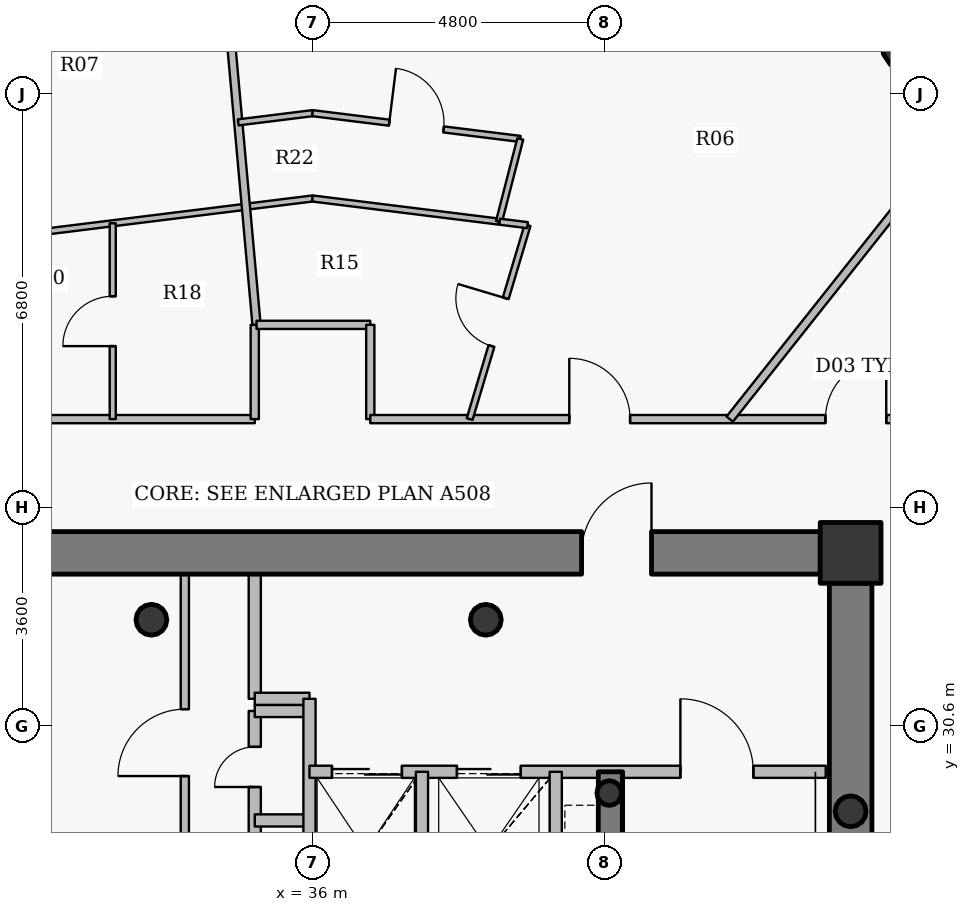
"""IFC4 building model, lengths in metres.
Left out: names, types, materials, properties, quantities, classifications, styles, units other than length and angle.
Written with IfcOpenShell. Run it as: python <this file> out.ifc"""

import sys

from ifc_helpers import new_model, si_unit, direction, frame, frame_2d, origin, origin_2d, place, context, subcontext, project, spatial, rectangle, hollow_circle, extrude, source, transform, mapped, element, fill, save


model = new_model("IFC4")
c1 = context("Model", 3, precision=1e-05, world=origin(), true_north=direction((0.0, 1.0)))
c2 = subcontext(c1, "Body", "Model", "MODEL_VIEW")
j1 = project(units=[si_unit("LENGTHUNIT", "METRE"), si_unit("PLANEANGLEUNIT", "RADIAN")], contexts=[c1])
p1 = place(None, origin())
s1 = spatial("IfcSite", under=j1, at=p1, CompositionType="ELEMENT")
p2 = place(p1, origin())
s2 = spatial("IfcBuilding", under=s1, at=p2, CompositionType="ELEMENT")
p3 = place(p2, frame((0.0, 0.0, 276.75)))
s3 = spatial("IfcBuildingStorey", under=s2, at=p3, CompositionType="ELEMENT", Elevation=276.75)
p4 = place(p3, frame((44.85, 33.45, 0.0), z_axis=(0.0, 0.0, 1.0), x_axis=(1.0, 0.0, 0.0)))
e1 = element("IfcColumn", 1, at=p4, inside=s3, PredefinedType="COLUMN", context=c2, shape_type="SweptSolid", body=[
    extrude(rectangle(XDim=1.0, YDim=1.0, at=origin_2d()), origin(), (0.0, 0.0, 1.0), 3.75),
])
for number, where, z_axis, x_axis in (
    (2, (38.85, 32.35, 0.0), (0.0, 0.0, 1.0), (1.0, 0.0, 0.0)),
    (3, (33.35, 32.35, 0.0), (0.0, 0.0, 1.0), (1.0, 0.0, 0.0)),
):
    element("IfcColumn", number, at=place(p3, frame(where, z_axis=z_axis, x_axis=x_axis)), inside=s3, PredefinedType="COLUMN", context=c2, shape_type="SweptSolid", body=[
        extrude(hollow_circle(Radius=0.254, WallThickness=0.02, at=origin_2d()), origin(), (0.0, 0.0, 1.0), 3.75),
    ])
p5 = place(p3, frame((40.88, 29.5, 0.0), z_axis=(0.0, 0.0, 1.0), x_axis=(1.0, 0.0, 0.0)))
e4 = element("IfcColumn", 4, at=p5, inside=s3, PredefinedType="COLUMN", context=c2, shape_type="SweptSolid", body=[
    extrude(hollow_circle(Radius=0.203, WallThickness=0.016, at=origin_2d()), origin(), (0.0, 0.0, 1.0), 3.75),
])
p6 = place(p3, frame((27.65, 33.45, 0.0), z_axis=(0.0, 0.0, 1.0), x_axis=(1.0, 0.0, 0.0)))
e5 = element("IfcWall", 5, at=p6, inside=s3, PredefinedType="SHEAR", context=c2, shape_type="SweptSolid", body=[
    extrude(rectangle(XDim=16.7, YDim=0.7, at=frame_2d((8.35, 0.0))), origin(), (0.0, 0.0, 1.0), 3.05),
])
p7 = place(p6, frame((12.775, 0.0, 0.0)))
e6 = element("IfcOpeningElement", 6, at=p7, cuts=e5, PredefinedType="OPENING", context=c2, shape_type="SweptSolid", body=[
    extrude(rectangle(XDim=1.15, YDim=2.15, at=origin_2d()), frame((0.575, 0.36, 1.075), z_axis=(0.0, -1.0, 0.0), x_axis=(1.0, 0.0, 0.0)), (0.0, 0.0, 1.0), 0.72),
])
p8 = place(p3, frame((44.85, 32.95, 0.0), z_axis=(0.0, 0.0, 1.0), x_axis=(0.0, -1.0, 0.0)))
e7 = element("IfcWall", 7, at=p8, inside=s3, PredefinedType="SHEAR", context=c2, shape_type="SweptSolid", body=[
    extrude(rectangle(XDim=11.9, YDim=0.7, at=frame_2d((5.95, 0.0))), origin(), (0.0, 0.0, 1.0), 3.05),
])
p9 = place(p3, frame((40.9, 27.25, 0.0), z_axis=(0.0, 0.0, 1.0), x_axis=(0.0, 1.0, 0.0)))
e8 = element("IfcWall", 8, at=p9, inside=s3, PredefinedType="SHEAR", context=c2, shape_type="SweptSolid", body=[
    extrude(rectangle(XDim=2.6, YDim=0.4, at=frame_2d((1.3, 0.0))), origin(), (0.0, 0.0, 1.0), 3.1),
])
p10 = place(p3, frame((45.854, 41.839, 0.0), z_axis=(0.0, 0.0, 1.0), x_axis=(1.0, 0.0, 0.0)))
e9 = element("IfcColumn", 9, at=p10, inside=s3, PredefinedType="COLUMN", context=c2, shape_type="SweptSolid", body=[
    extrude(hollow_circle(Radius=0.5, WallThickness=0.032, at=origin_2d()), origin(), (0.0, 0.0, 1.0), 3.75),
])
p11 = place(p3, frame((44.85, 29.2, 0.0), z_axis=(0.0, 0.0, 1.0), x_axis=(1.0, 0.0, 0.0)))
e10 = element("IfcColumn", 10, at=p11, inside=s3, PredefinedType="COLUMN", context=c2, shape_type="SweptSolid", body=[
    extrude(hollow_circle(Radius=0.254, WallThickness=0.02, at=origin_2d()), origin(), (0.0, 0.0, 1.0), 3.75),
])
p12 = place(p3, frame((24.95, 35.65, 0.0), z_axis=(0.0, 0.0, 1.0), x_axis=(1.0, 0.0, 0.0)))
e11 = element("IfcWall", 11, at=p12, inside=s3, PredefinedType="PARTITIONING", context=c2, shape_type="SweptSolid", body=[
    extrude(rectangle(XDim=10.1, YDim=0.135, at=frame_2d((5.05, 0.0))), origin(), (0.0, 0.0, 1.0), 3.035),
])
p13 = place(p12, frame((2.362, 0.0, 0.0)))
e12 = element("IfcOpeningElement", 12, at=p13, cuts=e11, PredefinedType="OPENING", context=c2, shape_type="SweptSolid", body=[
    extrude(rectangle(XDim=1.0, YDim=2.15, at=origin_2d()), frame((0.5, 0.078, 1.075), z_axis=(0.0, -1.0, 0.0), x_axis=(1.0, 0.0, 0.0)), (0.0, 0.0, 1.0), 0.155),
])
p14 = place(p3, frame((31.155, 38.677, 0.0), z_axis=(0.0, 0.0, 1.0), x_axis=(0.99239360053, 0.123105408601, 0.0)))
e13 = element("IfcWall", 13, at=p14, inside=s3, PredefinedType="PARTITIONING", context=c2, shape_type="SweptSolid", body=[
    extrude(rectangle(XDim=4.883, YDim=0.1, at=frame_2d((2.441, 0.0))), origin(), (0.0, 0.0, 1.0), 3.035),
])
p15 = place(p3, frame((32.714, 35.65, 0.0), z_axis=(0.0, 0.0, 1.0), x_axis=(0.0, 1.0, 0.0)))
e14 = element("IfcWall", 14, at=p15, inside=s3, PredefinedType="PARTITIONING", context=c2, shape_type="SweptSolid", body=[
    extrude(rectangle(XDim=3.221, YDim=0.1, at=frame_2d((1.61, 0.0))), origin(), (0.0, 0.0, 1.0), 3.5),
])
p16 = place(p15, frame((1.2, 0.0, 0.0)))
e15 = element("IfcOpeningElement", 15, at=p16, cuts=e14, PredefinedType="OPENING", context=c2, shape_type="SweptSolid", body=[
    extrude(rectangle(XDim=0.82, YDim=2.1, at=origin_2d()), frame((0.41, 0.06, 1.05), z_axis=(0.0, -1.0, 0.0), x_axis=(1.0, 0.0, 0.0)), (0.0, 0.0, 1.0), 0.12),
])
p17 = place(p3, frame((33.9, 27.56, 0.0), z_axis=(0.0, 0.0, 1.0), x_axis=(0.0, 1.0, 0.0)))
e16 = element("IfcWall", 16, at=p17, inside=s3, PredefinedType="PARTITIONING", context=c2, shape_type="SweptSolid", body=[
    extrude(rectangle(XDim=5.54, YDim=0.135, at=frame_2d((2.77, 0.0))), origin(), (0.0, 0.0, 1.0), 3.085),
])
p18 = place(p17, frame((2.22, 0.0, 0.0)))
e17 = element("IfcOpeningElement", 17, at=p18, cuts=e16, PredefinedType="OPENING", context=c2, shape_type="SweptSolid", body=[
    extrude(rectangle(XDim=1.1, YDim=2.15, at=origin_2d()), frame((0.55, 0.078, 1.075), z_axis=(0.0, -1.0, 0.0), x_axis=(1.0, 0.0, 0.0)), (0.0, 0.0, 1.0), 0.155),
])
p19 = place(p3, frame((34.436, 44.324, 0.0), z_axis=(0.0, 0.0, 1.0), x_axis=(0.089904837352, -0.99595036032, 0.0)))
e18 = element("IfcWall", 18, at=p19, inside=s3, PredefinedType="PARTITIONING", context=c2, shape_type="SweptSolid", body=[
    extrude(rectangle(XDim=7.153, YDim=0.135, at=frame_2d((3.576, 0.0))), origin(), (0.0, 0.0, 1.0), 2.985),
])
p20 = place(p3, frame((34.779, 40.53, 0.0), z_axis=(0.0, 0.0, 1.0), x_axis=(0.992405544762, 0.123009083917, 0.0)))
e19 = element("IfcWall", 19, at=p20, inside=s3, PredefinedType="PARTITIONING", context=c2, shape_type="SweptSolid", body=[
    extrude(rectangle(XDim=1.23, YDim=0.1, at=frame_2d((0.615, 0.0))), origin(), (0.0, 0.0, 1.0), 3.035),
])
p21 = place(p3, frame((35.05, 27.25, 0.0), z_axis=(0.0, 0.0, 1.0), x_axis=(0.0, 1.0, 0.0)))
e20 = element("IfcWall", 20, at=p21, inside=s3, PredefinedType="PARTITIONING", context=c2, shape_type="SweptSolid", body=[
    extrude(rectangle(XDim=3.6, YDim=0.2, at=frame_2d((1.8, 0.0))), origin(), (0.0, 0.0, 1.0), 3.5),
])
p22 = place(p21, frame((0.59, 0.0, 0.0)))
e21 = element("IfcOpeningElement", 21, at=p22, cuts=e20, PredefinedType="OPENING", context=c2, shape_type="SweptSolid", body=[
    extrude(rectangle(XDim=0.66, YDim=2.05, at=origin_2d()), frame((0.33, 0.11, 1.025), z_axis=(0.0, -1.0, 0.0), x_axis=(1.0, 0.0, 0.0)), (0.0, 0.0, 1.0), 0.22),
])
p23 = place(p21, frame((2.35, 0.0, 0.0)))
e22 = element("IfcOpeningElement", 22, at=p23, cuts=e20, PredefinedType="OPENING", context=c2, shape_type="SweptSolid", body=[
    extrude(rectangle(XDim=0.66, YDim=2.05, at=origin_2d()), frame((0.33, 0.11, 1.025), z_axis=(0.0, -1.0, 0.0), x_axis=(1.0, 0.0, 0.0)), (0.0, 0.0, 1.0), 0.22),
])
for number, where, z_axis, x_axis in (
    (23, (35.05, 29.05, 0.0), (0.0, 0.0, 1.0), (1.0, 0.0, 0.0)),
    (24, (35.05, 30.85, 0.0), (0.0, 0.0, 1.0), (1.0, 0.0, 0.0)),
):
    element("IfcWall", number, at=place(p3, frame(where, z_axis=z_axis, x_axis=x_axis)), inside=s3, PredefinedType="PARTITIONING", context=c2, shape_type="SweptSolid", body=[
        extrude(rectangle(XDim=0.9, YDim=0.2, at=frame_2d((0.45, 0.0))), origin(), (0.0, 0.0, 1.0), 3.5),
    ])
p24 = place(p3, frame((35.05, 31.05, 0.0), z_axis=(0.0, 0.0, 1.0), x_axis=(0.0, 1.0, 0.0)))
e25 = element("IfcWall", 25, at=p24, inside=s3, PredefinedType="PARTITIONING", context=c2, shape_type="SweptSolid", body=[
    extrude(rectangle(XDim=2.05, YDim=0.2, at=frame_2d((1.025, 0.0))), origin(), (0.0, 0.0, 1.0), 3.085),
])
p25 = place(p3, frame((35.05, 31.05, 0.0), z_axis=(0.0, 0.0, 1.0), x_axis=(1.0, 0.0, 0.0)))
e26 = element("IfcWall", 26, at=p25, inside=s3, PredefinedType="PARTITIONING", context=c2, shape_type="SweptSolid", body=[
    extrude(rectangle(XDim=0.9, YDim=0.2, at=frame_2d((0.45, 0.0))), origin(), (0.0, 0.0, 1.0), 3.5),
])
p26 = place(p3, frame((35.05, 35.65, 0.0), z_axis=(0.0, 0.0, 1.0), x_axis=(0.0, 1.0, 0.0)))
e27 = element("IfcWall", 27, at=p26, inside=s3, PredefinedType="PARTITIONING", context=c2, shape_type="SweptSolid", body=[
    extrude(rectangle(XDim=1.55, YDim=0.135, at=frame_2d((0.775, 0.0))), origin(), (0.0, 0.0, 1.0), 3.5),
])
p27 = place(p3, frame((35.079, 37.2, 0.0), z_axis=(0.0, 0.0, 1.0), x_axis=(1.0, 0.0, 0.0)))
e28 = element("IfcWall", 28, at=p27, inside=s3, PredefinedType="PARTITIONING", context=c2, shape_type="SweptSolid", body=[
    extrude(rectangle(XDim=1.871, YDim=0.135, at=frame_2d((0.935, 0.0))), origin(), (0.0, 0.0, 1.0), 3.035),
])
p28 = place(p3, frame((35.95, 27.25, 0.0), z_axis=(0.0, 0.0, 1.0), x_axis=(0.0, 1.0, 0.0)))
e29 = element("IfcWall", 29, at=p28, inside=s3, PredefinedType="PARTITIONING", context=c2, shape_type="SweptSolid", body=[
    extrude(rectangle(XDim=3.8, YDim=0.2, at=frame_2d((1.9, 0.0))), origin(), (0.0, 0.0, 1.0), 3.5),
])
p29 = place(p3, frame((35.95, 29.85, 0.0), z_axis=(0.0, 0.0, 1.0), x_axis=(1.0, 0.0, 0.0)))
e30 = element("IfcWall", 30, at=p29, inside=s3, PredefinedType="PARTITIONING", context=c2, shape_type="SweptSolid", body=[
    extrude(rectangle(XDim=8.49, YDim=0.2, at=frame_2d((4.245, 0.0))), origin(), (0.0, 0.0, 1.0), 3.085),
])
p30 = place(p29, frame((6.1, 0.0, 0.0)))
e31 = element("IfcOpeningElement", 31, at=p30, cuts=e30, PredefinedType="OPENING", context=c2, shape_type="SweptSolid", body=[
    extrude(rectangle(XDim=1.2, YDim=2.15, at=origin_2d()), frame((0.6, 0.11, 1.075), z_axis=(0.0, -1.0, 0.0), x_axis=(1.0, 0.0, 0.0)), (0.0, 0.0, 1.0), 0.22),
])
p31 = place(p29, frame((0.37, 0.0, 0.0)))
e32 = element("IfcOpeningElement", 32, at=p31, cuts=e30, PredefinedType="OPENING", context=c2, shape_type="SweptSolid", body=[
    extrude(rectangle(XDim=1.15, YDim=2.15, at=origin_2d()), frame((0.575, 0.11, 1.075), z_axis=(0.0, -1.0, 0.0), x_axis=(1.0, 0.0, 0.0)), (0.0, 0.0, 1.0), 0.22),
])
p32 = place(p29, frame((2.425, 0.0, 0.0)))
e33 = element("IfcOpeningElement", 33, at=p32, cuts=e30, PredefinedType="OPENING", context=c2, shape_type="SweptSolid", body=[
    extrude(rectangle(XDim=1.05, YDim=2.15, at=origin_2d()), frame((0.525, 0.11, 1.075), z_axis=(0.0, -1.0, 0.0), x_axis=(1.0, 0.0, 0.0)), (0.0, 0.0, 1.0), 0.22),
])
p33 = place(p3, frame((36.0, 39.278, 0.0), z_axis=(0.0, 0.0, 1.0), x_axis=(0.992394132602, -0.123101119315, 0.0)))
e34 = element("IfcWall", 34, at=p33, inside=s3, PredefinedType="PARTITIONING", context=c2, shape_type="SweptSolid", body=[
    extrude(rectangle(XDim=3.09, YDim=0.1, at=frame_2d((1.545, 0.0))), origin(), (0.0, 0.0, 1.0), 3.035),
])
p34 = place(p3, frame((36.0, 40.681, 0.0), z_axis=(0.0, 0.0, 1.0), x_axis=(0.992395241541, -0.123092179145, 0.0)))
e35 = element("IfcWall", 35, at=p34, inside=s3, PredefinedType="PARTITIONING", context=c2, shape_type="SweptSolid", body=[
    extrude(rectangle(XDim=3.443, YDim=0.1, at=frame_2d((1.722, 0.0))), origin(), (0.0, 0.0, 1.0), 3.035),
])
p35 = place(p34, frame((1.271, 0.0, 0.0)))
e36 = element("IfcOpeningElement", 36, at=p35, cuts=e35, PredefinedType="OPENING", context=c2, shape_type="SweptSolid", body=[
    extrude(rectangle(XDim=0.9, YDim=2.1, at=origin_2d()), frame((0.45, 0.06, 1.05), z_axis=(0.0, -1.0, 0.0), x_axis=(1.0, 0.0, 0.0)), (0.0, 0.0, 1.0), 0.12),
])
p36 = place(p3, frame((36.95, 35.65, 0.0), z_axis=(0.0, 0.0, 1.0), x_axis=(0.0, 1.0, 0.0)))
e37 = element("IfcWall", 37, at=p36, inside=s3, PredefinedType="PARTITIONING", context=c2, shape_type="SweptSolid", body=[
    extrude(rectangle(XDim=1.55, YDim=0.135, at=frame_2d((0.775, 0.0))), origin(), (0.0, 0.0, 1.0), 3.5),
])
p37 = place(p3, frame((36.95, 35.65, 0.0), z_axis=(0.0, 0.0, 1.0), x_axis=(1.0, 0.0, 0.0)))
e38 = element("IfcWall", 38, at=p37, inside=s3, PredefinedType="PARTITIONING", context=c2, shape_type="SweptSolid", body=[
    extrude(rectangle(XDim=10.1, YDim=0.135, at=frame_2d((5.05, 0.0))), origin(), (0.0, 0.0, 1.0), 3.035),
])
p38 = place(p37, frame((7.486, 0.0, 0.0)))
e39 = element("IfcOpeningElement", 39, at=p38, cuts=e38, PredefinedType="OPENING", context=c2, shape_type="SweptSolid", body=[
    extrude(rectangle(XDim=1.0, YDim=2.15, at=origin_2d()), frame((0.5, 0.078, 1.075), z_axis=(0.0, -1.0, 0.0), x_axis=(1.0, 0.0, 0.0)), (0.0, 0.0, 1.0), 0.155),
])
p39 = place(p37, frame((3.272, 0.0, 0.0)))
e40 = element("IfcOpeningElement", 40, at=p39, cuts=e38, PredefinedType="OPENING", context=c2, shape_type="SweptSolid", body=[
    extrude(rectangle(XDim=1.0, YDim=2.15, at=origin_2d()), frame((0.5, 0.078, 1.075), z_axis=(0.0, -1.0, 0.0), x_axis=(1.0, 0.0, 0.0)), (0.0, 0.0, 1.0), 0.155),
])
p40 = place(p3, frame((37.8, 27.25, 0.0), z_axis=(0.0, 0.0, 1.0), x_axis=(0.0, 1.0, 0.0)))
e41 = element("IfcWall", 41, at=p40, inside=s3, PredefinedType="PARTITIONING", context=c2, shape_type="SweptSolid", body=[
    extrude(rectangle(XDim=2.6, YDim=0.2, at=frame_2d((1.3, 0.0))), origin(), (0.0, 0.0, 1.0), 3.5),
])
p41 = place(p3, frame((38.584, 35.65, 0.0), z_axis=(0.0, 0.0, 1.0), x_axis=(0.286190312746, 0.958172794902, 0.0)))
e42 = element("IfcWall", 42, at=p41, inside=s3, PredefinedType="PARTITIONING", context=c2, shape_type="SweptSolid", body=[
    extrude(rectangle(XDim=3.329, YDim=0.1, at=frame_2d((1.664, 0.0))), origin(), (0.0, 0.0, 1.0), 3.5),
])
p42 = place(p41, frame((1.254, 0.0, 0.0)))
e43 = element("IfcOpeningElement", 43, at=p42, cuts=e42, PredefinedType="OPENING", context=c2, shape_type="SweptSolid", body=[
    extrude(rectangle(XDim=0.82, YDim=2.1, at=origin_2d()), frame((0.41, 0.06, 1.05), z_axis=(0.0, -1.0, 0.0), x_axis=(1.0, 0.0, 0.0)), (0.0, 0.0, 1.0), 0.12),
])
p43 = place(p3, frame((39.066, 38.898, 0.0), z_axis=(0.0, 0.0, 1.0), x_axis=(0.249688699354, 0.968326160658, 0.0)))
e44 = element("IfcWall", 44, at=p43, inside=s3, PredefinedType="PARTITIONING", context=c2, shape_type="SweptSolid", body=[
    extrude(rectangle(XDim=1.404, YDim=0.1, at=frame_2d((0.702, 0.0))), origin(), (0.0, 0.0, 1.0), 3.5),
])
p44 = place(p3, frame((39.076, 38.896, 0.0), z_axis=(0.0, 0.0, 1.0), x_axis=(0.99238281179, -0.12319234905, 0.0)))
e45 = element("IfcWall", 45, at=p44, inside=s3, PredefinedType="PARTITIONING", context=c2, shape_type="SweptSolid", body=[
    extrude(rectangle(XDim=0.464, YDim=0.1, at=frame_2d((0.232, 0.0))), origin(), (0.0, 0.0, 1.0), 3.5),
])
p45 = place(p3, frame((40.0, 25.45, 0.0), z_axis=(0.0, 0.0, 1.0), x_axis=(0.0, 1.0, 0.0)))
e46 = element("IfcWall", 46, at=p45, inside=s3, PredefinedType="PARTITIONING", context=c2, shape_type="SweptSolid", body=[
    extrude(rectangle(XDim=4.4, YDim=0.2, at=frame_2d((2.2, 0.0))), origin(), (0.0, 0.0, 1.0), 3.5),
])
p46 = place(p3, frame((42.861, 35.65, 0.0), z_axis=(0.0, 0.0, 1.0), x_axis=(0.621439784824, 0.783461928774, 0.0)))
e47 = element("IfcWall", 47, at=p46, inside=s3, PredefinedType="PARTITIONING", context=c2, shape_type="SweptSolid", body=[
    extrude(rectangle(XDim=7.796, YDim=0.135, at=frame_2d((3.898, 0.0))), origin(), (0.0, 0.0, 1.0), 2.985),
])
p47 = place(p3, frame((45.2, 33.8, 0.0), z_axis=(0.0, 0.0, 1.0), x_axis=(-1.0, 0.0, 0.0)))
e48 = element("IfcWall", 48, at=p47, inside=s3, PredefinedType="PARTITIONING", context=c2, shape_type="SweptSolid", body=[
    extrude(rectangle(XDim=0.84, YDim=0.135, at=frame_2d((0.42, 0.0))), origin(), (0.0, 0.0, 1.0), 3.035),
])
p48 = place(p3, frame((45.2, 32.96, 0.0), z_axis=(0.0, 0.0, 1.0), x_axis=(0.0, 1.0, 0.0)))
e49 = element("IfcWall", 49, at=p48, inside=s3, PredefinedType="PARTITIONING", context=c2, shape_type="SweptSolid", body=[
    extrude(rectangle(XDim=0.532, YDim=0.135, at=frame_2d((0.266, 0.0))), origin(), (0.0, 0.0, 1.0), 3.5),
])
m1 = source(origin(), c2, "Body", "SweptSolid", [
    extrude(rectangle(XDim=1.15, YDim=2.15, at=origin_2d()), frame((0.575, 0.025, 1.075), z_axis=(0.0, -1.0, 0.0), x_axis=(1.0, 0.0, 0.0)), (0.0, 0.0, 1.0), 0.05),
])
p49 = place(p7, origin())
e50 = element("IfcDoor", 50, at=p49, inside=s3, OperationType="SINGLE_SWING_RIGHT", PredefinedType="DOOR", context=c2, shape_type="MappedRepresentation", body=[
    mapped(m1, transform((0.0, 0.0, 0.0), x_axis=(1.0, 0.0, 0.0), y_axis=(0.0, 1.0, 0.0), z_axis=(0.0, 0.0, 1.0), scale=1.0)),
])
fill(e6, e50)
m2 = source(origin(), c2, "Body", "SweptSolid", [
    extrude(rectangle(XDim=1.2, YDim=2.15, at=origin_2d()), frame((0.6, 0.025, 1.075), z_axis=(0.0, -1.0, 0.0), x_axis=(1.0, 0.0, 0.0)), (0.0, 0.0, 1.0), 0.05),
])
p50 = place(p30, origin())
e51 = element("IfcDoor", 51, at=p50, inside=s3, OperationType="SINGLE_SWING_LEFT", PredefinedType="DOOR", context=c2, shape_type="MappedRepresentation", body=[
    mapped(m2, transform((0.0, 0.0, 0.0), x_axis=(1.0, 0.0, 0.0), y_axis=(0.0, 1.0, 0.0), z_axis=(0.0, 0.0, 1.0), scale=1.0)),
])
fill(e31, e51)
m3 = source(origin(), c2, "Body", "SweptSolid", [
    extrude(rectangle(XDim=1.15, YDim=2.15, at=origin_2d()), frame((0.575, 0.025, 1.075), z_axis=(0.0, -1.0, 0.0), x_axis=(1.0, 0.0, 0.0)), (0.0, 0.0, 1.0), 0.05),
])
p51 = place(p31, origin())
e52 = element("IfcDoor", 52, at=p51, inside=s3, OperationType="DOUBLE_DOOR_SLIDING", PredefinedType="USERDEFINED", context=c2, shape_type="MappedRepresentation", body=[
    mapped(m3, transform((0.0, 0.0, 0.0), x_axis=(1.0, 0.0, 0.0), y_axis=(0.0, 1.0, 0.0), z_axis=(0.0, 0.0, 1.0), scale=1.0)),
])
fill(e32, e52)
m4 = source(origin(), c2, "Body", "SweptSolid", [
    extrude(rectangle(XDim=1.05, YDim=2.15, at=origin_2d()), frame((0.525, 0.025, 1.075), z_axis=(0.0, -1.0, 0.0), x_axis=(1.0, 0.0, 0.0)), (0.0, 0.0, 1.0), 0.05),
])
p52 = place(p32, origin())
e53 = element("IfcDoor", 53, at=p52, inside=s3, OperationType="DOUBLE_DOOR_SLIDING", PredefinedType="USERDEFINED", context=c2, shape_type="MappedRepresentation", body=[
    mapped(m4, transform((0.0, 0.0, 0.0), x_axis=(1.0, 0.0, 0.0), y_axis=(0.0, 1.0, 0.0), z_axis=(0.0, 0.0, 1.0), scale=1.0)),
])
fill(e33, e53)
m5 = source(origin(), c2, "Body", "SweptSolid", [
    extrude(rectangle(XDim=1.0, YDim=2.15, at=origin_2d()), frame((0.5, 0.025, 1.075), z_axis=(0.0, -1.0, 0.0), x_axis=(1.0, 0.0, 0.0)), (0.0, 0.0, 1.0), 0.05),
])
p53 = place(p38, origin())
e54 = element("IfcDoor", 54, at=p53, inside=s3, OperationType="SINGLE_SWING_RIGHT", PredefinedType="DOOR", context=c2, shape_type="MappedRepresentation", body=[
    mapped(m5, transform((0.0, 0.0, 0.0), x_axis=(1.0, 0.0, 0.0), y_axis=(0.0, 1.0, 0.0), z_axis=(0.0, 0.0, 1.0), scale=1.0)),
])
fill(e39, e54)
p54 = place(p39, origin())
e55 = element("IfcDoor", 55, at=p54, inside=s3, OperationType="SINGLE_SWING_LEFT", PredefinedType="DOOR", context=c2, shape_type="MappedRepresentation", body=[
    mapped(m5, transform((0.0, 0.0, 0.0), x_axis=(1.0, 0.0, 0.0), y_axis=(0.0, 1.0, 0.0), z_axis=(0.0, 0.0, 1.0), scale=1.0)),
])
fill(e40, e55)
m6 = source(origin(), c2, "Body", "SweptSolid", [
    extrude(rectangle(XDim=0.82, YDim=2.1, at=origin_2d()), frame((0.41, 0.025, 1.05), z_axis=(0.0, -1.0, 0.0), x_axis=(1.0, 0.0, 0.0)), (0.0, 0.0, 1.0), 0.05),
])
p55 = place(p42, origin())
e56 = element("IfcDoor", 56, at=p55, inside=s3, OperationType="SINGLE_SWING_RIGHT", PredefinedType="DOOR", context=c2, shape_type="MappedRepresentation", body=[
    mapped(m6, transform((0.0, 0.0, 0.0), x_axis=(1.0, 0.0, 0.0), y_axis=(0.0, 1.0, 0.0), z_axis=(0.0, 0.0, 1.0), scale=1.0)),
])
fill(e43, e56)
m7 = source(origin(), c2, "Body", "SweptSolid", [
    extrude(rectangle(XDim=0.9, YDim=2.1, at=origin_2d()), frame((0.45, 0.025, 1.05), z_axis=(0.0, -1.0, 0.0), x_axis=(1.0, 0.0, 0.0)), (0.0, 0.0, 1.0), 0.05),
])
p56 = place(p35, origin())
e57 = element("IfcDoor", 57, at=p56, inside=s3, OperationType="SINGLE_SWING_LEFT", PredefinedType="DOOR", context=c2, shape_type="MappedRepresentation", body=[
    mapped(m7, transform((0.0, 0.0, 0.0), x_axis=(1.0, 0.0, 0.0), y_axis=(0.0, 1.0, 0.0), z_axis=(0.0, 0.0, 1.0), scale=1.0)),
])
fill(e36, e57)
p57 = place(p16, origin())
e58 = element("IfcDoor", 58, at=p57, inside=s3, OperationType="SINGLE_SWING_LEFT", PredefinedType="DOOR", context=c2, shape_type="MappedRepresentation", body=[
    mapped(m6, transform((0.0, 0.0, 0.0), x_axis=(1.0, 0.0, 0.0), y_axis=(0.0, 1.0, 0.0), z_axis=(0.0, 0.0, 1.0), scale=1.0)),
])
fill(e15, e58)
m8 = source(origin(), c2, "Body", "SweptSolid", [
    extrude(rectangle(XDim=0.66, YDim=2.05, at=origin_2d()), frame((0.33, 0.025, 1.025), z_axis=(0.0, -1.0, 0.0), x_axis=(1.0, 0.0, 0.0)), (0.0, 0.0, 1.0), 0.05),
])
p58 = place(p23, origin())
e59 = element("IfcDoor", 59, at=p58, inside=s3, OperationType="SINGLE_SWING_LEFT", PredefinedType="USERDEFINED", context=c2, shape_type="MappedRepresentation", body=[
    mapped(m8, transform((0.0, 0.0, 0.0), x_axis=(1.0, 0.0, 0.0), y_axis=(0.0, 1.0, 0.0), z_axis=(0.0, 0.0, 1.0), scale=1.0)),
])
fill(e22, e59)
m9 = source(origin(), c2, "Body", "SweptSolid", [
    extrude(rectangle(XDim=1.1, YDim=2.15, at=origin_2d()), frame((0.55, 0.025, 1.075), z_axis=(0.0, -1.0, 0.0), x_axis=(1.0, 0.0, 0.0)), (0.0, 0.0, 1.0), 0.05),
])
p59 = place(p18, origin())
e60 = element("IfcDoor", 60, at=p59, inside=s3, OperationType="SINGLE_SWING_LEFT", PredefinedType="DOOR", context=c2, shape_type="MappedRepresentation", body=[
    mapped(m9, transform((0.0, 0.0, 0.0), x_axis=(1.0, 0.0, 0.0), y_axis=(0.0, 1.0, 0.0), z_axis=(0.0, 0.0, 1.0), scale=1.0)),
])
fill(e17, e60)
save(model, sys.argv[1])
